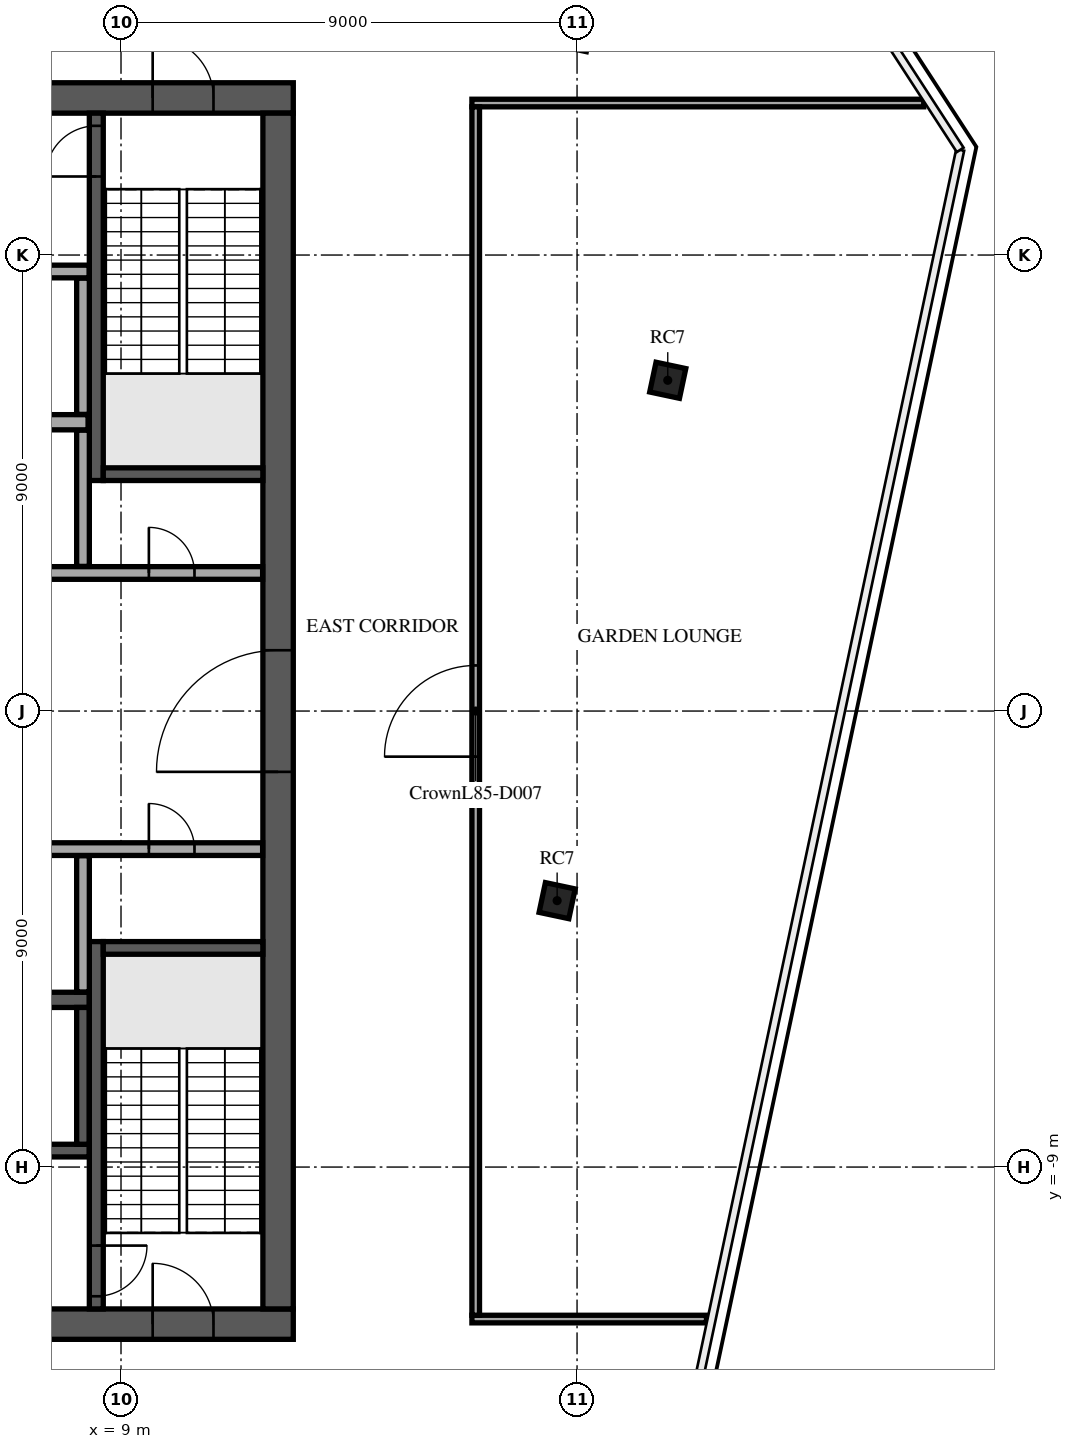
"""IFC4 building model, lengths in metres.
Left out: names, types, materials, properties, quantities, classifications, styles, units other than length and angle.
Written with IfcOpenShell. Run it as: python <this file> out.ifc"""

import sys

from ifc_helpers import new_model, si_unit, direction, frame, frame_2d, origin, origin_2d, place, context, subcontext, project, spatial, rectangle, extrude, element, fill, save


model = new_model("IFC4")
c1 = context("Model", 3, precision=1e-05, world=origin(), true_north=direction((0.0, 1.0)))
c2 = subcontext(c1, "Body", "Model", "MODEL_VIEW")
j1 = project(units=[si_unit("LENGTHUNIT", "METRE"), si_unit("PLANEANGLEUNIT", "RADIAN")], contexts=[c1])
p1 = place(None, origin())
s1 = spatial("IfcSite", under=j1, at=p1, CompositionType="ELEMENT")
p2 = place(p1, origin())
s2 = spatial("IfcBuilding", under=s1, at=p2, CompositionType="ELEMENT")
p3 = place(p2, frame((0.0, 0.0, 363.1)))
s3 = spatial("IfcBuildingStorey", under=s2, at=p3, CompositionType="ELEMENT", Elevation=363.1)
for number, where, z_axis, x_axis in (
    (1, (17.607, -3.742, 0.0), (0.0, 0.0, 1.0), (0.208, 0.978, 0.0)),
    (2, (19.79, 6.528, 0.0), (0.0, 0.0, 1.0), (0.208, 0.978, 0.0)),
):
    element("IfcColumn", number, at=place(p3, frame(where, z_axis=z_axis, x_axis=x_axis)), inside=s3, PredefinedType="COLUMN", context=c2, shape_type="SweptSolid", body=[
        extrude(rectangle(XDim=0.6, YDim=0.6, at=origin_2d()), origin(), (0.0, 0.0, 1.0), 5.0),
    ])
p4 = place(p3, frame((-12.4, 12.1, 0.0), z_axis=(0.0, 0.0, 1.0), x_axis=(1.0, 0.0, 0.0)))
e3 = element("IfcWall", 3, at=p4, inside=s3, PredefinedType="SHEAR", context=c2, shape_type="SweptSolid", body=[
    extrude(rectangle(XDim=24.8, YDim=0.6, at=frame_2d((12.4, 0.0))), origin(), (0.0, 0.0, 1.0), 4.7),
])
p5 = place(p4, frame((11.2, 0.0, 0.0)))
e4 = element("IfcOpeningElement", 4, at=p5, cuts=e3, PredefinedType="OPENING", context=c2, shape_type="SweptSolid", body=[
    extrude(rectangle(XDim=2.4, YDim=2.4, at=frame_2d((1.2, 1.2))), frame((0.0, 0.31, 0.0), z_axis=(0.0, -1.0, 0.0), x_axis=(1.0, 0.0, 0.0)), (0.0, 0.0, 1.0), 0.62),
])
p6 = place(p4, frame((22.025, 0.0, 0.0)))
e5 = element("IfcOpeningElement", 5, at=p6, cuts=e3, PredefinedType="OPENING", context=c2, shape_type="SweptSolid", body=[
    extrude(rectangle(XDim=1.2, YDim=2.1, at=frame_2d((0.6, 1.05))), frame((0.0, 0.31, 0.0), z_axis=(0.0, -1.0, 0.0), x_axis=(1.0, 0.0, 0.0)), (0.0, 0.0, 1.0), 0.62),
])
p7 = place(p4, frame((1.0, 0.0, 0.0)))
e6 = element("IfcOpeningElement", 6, at=p7, cuts=e3, PredefinedType="OPENING", context=c2, shape_type="SweptSolid", body=[
    extrude(rectangle(XDim=1.0, YDim=2.1, at=frame_2d((0.5, 1.05))), frame((0.0, 0.31, 0.0), z_axis=(0.0, -1.0, 0.0), x_axis=(1.0, 0.0, 0.0)), (0.0, 0.0, 1.0), 0.62),
])
p8 = place(p3, frame((-12.4, -12.1, 0.0), z_axis=(0.0, 0.0, 1.0), x_axis=(1.0, 0.0, 0.0)))
e7 = element("IfcWall", 7, at=p8, inside=s3, PredefinedType="SHEAR", context=c2, shape_type="SweptSolid", body=[
    extrude(rectangle(XDim=24.8, YDim=0.6, at=frame_2d((12.4, 0.0))), origin(), (0.0, 0.0, 1.0), 4.7),
])
p9 = place(p8, frame((7.3, 0.0, 0.0)))
e8 = element("IfcOpeningElement", 8, at=p9, cuts=e7, PredefinedType="OPENING", context=c2, shape_type="SweptSolid", body=[
    extrude(rectangle(XDim=2.0, YDim=2.1, at=frame_2d((1.0, 1.05))), frame((0.0, 0.31, 0.0), z_axis=(0.0, -1.0, 0.0), x_axis=(1.0, 0.0, 0.0)), (0.0, 0.0, 1.0), 0.62),
])
p10 = place(p8, frame((17.425, 0.0, 0.0)))
e9 = element("IfcOpeningElement", 9, at=p10, cuts=e7, PredefinedType="OPENING", context=c2, shape_type="SweptSolid", body=[
    extrude(rectangle(XDim=1.2, YDim=2.1, at=frame_2d((0.6, 1.05))), frame((0.0, 0.31, 0.0), z_axis=(0.0, -1.0, 0.0), x_axis=(1.0, 0.0, 0.0)), (0.0, 0.0, 1.0), 0.62),
])
p11 = place(p8, frame((1.575, 0.0, 0.0)))
e10 = element("IfcOpeningElement", 10, at=p11, cuts=e7, PredefinedType="OPENING", context=c2, shape_type="SweptSolid", body=[
    extrude(rectangle(XDim=1.2, YDim=2.1, at=frame_2d((0.6, 1.05))), frame((0.0, 0.31, 0.0), z_axis=(0.0, -1.0, 0.0), x_axis=(1.0, 0.0, 0.0)), (0.0, 0.0, 1.0), 0.62),
])
p12 = place(p8, frame((22.025, 0.0, 0.0)))
e11 = element("IfcOpeningElement", 11, at=p12, cuts=e7, PredefinedType="OPENING", context=c2, shape_type="SweptSolid", body=[
    extrude(rectangle(XDim=1.2, YDim=2.1, at=frame_2d((0.6, 1.05))), frame((0.0, 0.31, 0.0), z_axis=(0.0, -1.0, 0.0), x_axis=(1.0, 0.0, 0.0)), (0.0, 0.0, 1.0), 0.62),
])
p13 = place(p3, frame((12.1, -11.8, 0.0), z_axis=(0.0, 0.0, 1.0), x_axis=(0.0, 1.0, 0.0)))
e12 = element("IfcWall", 12, at=p13, inside=s3, PredefinedType="SHEAR", context=c2, shape_type="SweptSolid", body=[
    extrude(rectangle(XDim=23.6, YDim=0.6, at=frame_2d((11.8, 0.0))), origin(), (0.0, 0.0, 1.0), 4.7),
])
p14 = place(p13, frame((10.6, 0.0, 0.0)))
e13 = element("IfcOpeningElement", 13, at=p14, cuts=e12, PredefinedType="OPENING", context=c2, shape_type="SweptSolid", body=[
    extrude(rectangle(XDim=2.4, YDim=2.4, at=frame_2d((1.2, 1.2))), frame((0.0, 0.31, 0.0), z_axis=(0.0, -1.0, 0.0), x_axis=(1.0, 0.0, 0.0)), (0.0, 0.0, 1.0), 0.62),
])
p15 = place(p3, frame((-2.875, -5.7, 0.0), z_axis=(0.0, 0.0, 1.0), x_axis=(1.0, 0.0, 0.0)))
e14 = element("IfcWall", 14, at=p15, inside=s3, PredefinedType="SOLIDWALL", context=c2, shape_type="SweptSolid", body=[
    extrude(rectangle(XDim=11.25, YDim=0.3, at=frame_2d((5.625, 0.0))), origin(), (0.0, 0.0, 1.0), 4.7),
])
p16 = place(p3, frame((-2.875, -8.675, 0.0), z_axis=(0.0, 0.0, 1.0), x_axis=(1.0, 0.0, 0.0)))
e15 = element("IfcWall", 15, at=p16, inside=s3, PredefinedType="SOLIDWALL", context=c2, shape_type="SweptSolid", body=[
    extrude(rectangle(XDim=11.25, YDim=0.25, at=frame_2d((5.625, 0.0))), origin(), (0.0, 0.0, 1.0), 4.7),
])
p17 = place(p16, frame((0.9, 0.0, 0.0)))
e16 = element("IfcOpeningElement", 16, at=p17, cuts=e15, PredefinedType="OPENING", context=c2, shape_type="SweptSolid", body=[
    extrude(rectangle(XDim=1.2, YDim=2.1, at=frame_2d((0.6, 1.05))), frame((0.0, 0.135, 0.0), z_axis=(0.0, -1.0, 0.0), x_axis=(1.0, 0.0, 0.0)), (0.0, 0.0, 1.0), 0.27),
])
p18 = place(p16, frame((3.65, 0.0, 0.0)))
e17 = element("IfcOpeningElement", 17, at=p18, cuts=e15, PredefinedType="OPENING", context=c2, shape_type="SweptSolid", body=[
    extrude(rectangle(XDim=1.2, YDim=2.1, at=frame_2d((0.6, 1.05))), frame((0.0, 0.135, 0.0), z_axis=(0.0, -1.0, 0.0), x_axis=(1.0, 0.0, 0.0)), (0.0, 0.0, 1.0), 0.27),
])
p19 = place(p16, frame((6.4, 0.0, 0.0)))
e18 = element("IfcOpeningElement", 18, at=p19, cuts=e15, PredefinedType="OPENING", context=c2, shape_type="SweptSolid", body=[
    extrude(rectangle(XDim=1.2, YDim=2.1, at=frame_2d((0.6, 1.05))), frame((0.0, 0.135, 0.0), z_axis=(0.0, -1.0, 0.0), x_axis=(1.0, 0.0, 0.0)), (0.0, 0.0, 1.0), 0.27),
])
p20 = place(p16, frame((9.15, 0.0, 0.0)))
e19 = element("IfcOpeningElement", 19, at=p20, cuts=e15, PredefinedType="OPENING", context=c2, shape_type="SweptSolid", body=[
    extrude(rectangle(XDim=1.2, YDim=2.1, at=frame_2d((0.6, 1.05))), frame((0.0, 0.135, 0.0), z_axis=(0.0, -1.0, 0.0), x_axis=(1.0, 0.0, 0.0)), (0.0, 0.0, 1.0), 0.27),
])
p21 = place(p3, frame((8.25, -8.55, 0.0), z_axis=(0.0, 0.0, 1.0), x_axis=(0.0, 1.0, 0.0)))
e20 = element("IfcWall", 20, at=p21, inside=s3, PredefinedType="SOLIDWALL", context=c2, shape_type="SweptSolid", body=[
    extrude(rectangle(XDim=2.7, YDim=0.25, at=frame_2d((1.35, 0.0))), origin(), (0.0, 0.0, 1.0), 4.7),
])
p22 = place(p3, frame((8.512, 4.55, 0.0), z_axis=(0.0, 0.0, 1.0), x_axis=(0.0, 1.0, 0.0)))
e21 = element("IfcWall", 21, at=p22, inside=s3, PredefinedType="SOLIDWALL", context=c2, shape_type="SweptSolid", body=[
    extrude(rectangle(XDim=7.25, YDim=0.275, at=frame_2d((3.625, 0.0))), origin(), (0.0, 0.0, 1.0), 4.7),
])
p23 = place(p22, frame((6.0, 0.0, 0.0)))
e22 = element("IfcOpeningElement", 22, at=p23, cuts=e21, PredefinedType="OPENING", context=c2, shape_type="SweptSolid", body=[
    extrude(rectangle(XDim=1.0, YDim=2.1, at=frame_2d((0.5, 1.05))), frame((0.0, 0.147, 0.0), z_axis=(0.0, -1.0, 0.0), x_axis=(1.0, 0.0, 0.0)), (0.0, 0.0, 1.0), 0.295),
])
p24 = place(p3, frame((8.65, 4.675, 0.0), z_axis=(0.0, 0.0, 1.0), x_axis=(1.0, 0.0, 0.0)))
e23 = element("IfcWall", 23, at=p24, inside=s3, PredefinedType="SOLIDWALL", context=c2, shape_type="SweptSolid", body=[
    extrude(rectangle(XDim=3.15, YDim=0.25, at=frame_2d((1.575, 0.0))), origin(), (0.0, 0.0, 1.0), 4.7),
])
p25 = place(p3, frame((8.512, -4.55, 0.0), z_axis=(0.0, 0.0, 1.0), x_axis=(0.0, -1.0, 0.0)))
e24 = element("IfcWall", 24, at=p25, inside=s3, PredefinedType="SOLIDWALL", context=c2, shape_type="SweptSolid", body=[
    extrude(rectangle(XDim=7.25, YDim=0.275, at=frame_2d((3.625, 0.0))), origin(), (0.0, 0.0, 1.0), 4.7),
])
p26 = place(p25, frame((6.0, 0.0, 0.0)))
e25 = element("IfcOpeningElement", 25, at=p26, cuts=e24, PredefinedType="OPENING", context=c2, shape_type="SweptSolid", body=[
    extrude(rectangle(XDim=1.0, YDim=2.1, at=frame_2d((0.5, 1.05))), frame((0.0, 0.147, 0.0), z_axis=(0.0, -1.0, 0.0), x_axis=(1.0, 0.0, 0.0)), (0.0, 0.0, 1.0), 0.295),
])
p27 = place(p3, frame((8.65, -4.675, 0.0), z_axis=(0.0, 0.0, 1.0), x_axis=(1.0, 0.0, 0.0)))
e26 = element("IfcWall", 26, at=p27, inside=s3, PredefinedType="SOLIDWALL", context=c2, shape_type="SweptSolid", body=[
    extrude(rectangle(XDim=3.15, YDim=0.25, at=frame_2d((1.575, 0.0))), origin(), (0.0, 0.0, 1.0), 4.7),
])
p28 = place(p3, frame((8.25, -5.545, 0.0), z_axis=(0.0, 0.0, 1.0), x_axis=(0.0, 1.0, 0.0)))
e27 = element("IfcWall", 27, at=p28, inside=s3, PredefinedType="PARTITIONING", context=c2, shape_type="SweptSolid", body=[
    extrude(rectangle(XDim=2.69, YDim=0.25, at=frame_2d((1.345, 0.0))), origin(), (0.0, 0.0, 1.0), 4.7),
])
p29 = place(p3, frame((5.63, -2.725, 0.0), z_axis=(0.0, 0.0, 1.0), x_axis=(1.0, 0.0, 0.0)))
e28 = element("IfcWall", 28, at=p29, inside=s3, PredefinedType="PARTITIONING", context=c2, shape_type="SweptSolid", body=[
    extrude(rectangle(XDim=6.165, YDim=0.25, at=frame_2d((3.083, 0.0))), origin(), (0.0, 0.0, 1.0), 4.7),
])
p30 = place(p29, frame((0.745, 0.0, 0.0)))
e29 = element("IfcOpeningElement", 29, at=p30, cuts=e28, PredefinedType="OPENING", context=c2, shape_type="SweptSolid", body=[
    extrude(rectangle(XDim=1.0, YDim=2.1, at=frame_2d((0.5, 1.05))), frame((0.0, 0.135, 0.0), z_axis=(0.0, -1.0, 0.0), x_axis=(1.0, 0.0, 0.0)), (0.0, 0.0, 1.0), 0.27),
])
p31 = place(p29, frame((3.92, 0.0, 0.0)))
e30 = element("IfcOpeningElement", 30, at=p31, cuts=e28, PredefinedType="OPENING", context=c2, shape_type="SweptSolid", body=[
    extrude(rectangle(XDim=0.9, YDim=2.1, at=frame_2d((0.45, 1.05))), frame((0.0, 0.135, 0.0), z_axis=(0.0, -1.0, 0.0), x_axis=(1.0, 0.0, 0.0)), (0.0, 0.0, 1.0), 0.27),
])
p32 = place(p3, frame((-11.795, 2.725, 0.0), z_axis=(0.0, 0.0, 1.0), x_axis=(1.0, 0.0, 0.0)))
e31 = element("IfcWall", 31, at=p32, inside=s3, PredefinedType="PARTITIONING", context=c2, shape_type="SweptSolid", body=[
    extrude(rectangle(XDim=23.59, YDim=0.25, at=frame_2d((11.795, 0.0))), origin(), (0.0, 0.0, 1.0), 4.7),
])
p33 = place(p32, frame((21.345, 0.0, 0.0)))
e32 = element("IfcOpeningElement", 32, at=p33, cuts=e31, PredefinedType="OPENING", context=c2, shape_type="SweptSolid", body=[
    extrude(rectangle(XDim=0.9, YDim=2.1, at=frame_2d((0.45, 1.05))), frame((0.0, 0.135, 0.0), z_axis=(0.0, -1.0, 0.0), x_axis=(1.0, 0.0, 0.0)), (0.0, 0.0, 1.0), 0.27),
])
p34 = place(p32, frame((1.345, 0.0, 0.0)))
e33 = element("IfcOpeningElement", 33, at=p34, cuts=e31, PredefinedType="OPENING", context=c2, shape_type="SweptSolid", body=[
    extrude(rectangle(XDim=0.9, YDim=2.1, at=frame_2d((0.45, 1.05))), frame((0.0, 0.135, 0.0), z_axis=(0.0, -1.0, 0.0), x_axis=(1.0, 0.0, 0.0)), (0.0, 0.0, 1.0), 0.27),
])
p35 = place(p32, frame((4.42, 0.0, 0.0)))
e34 = element("IfcOpeningElement", 34, at=p35, cuts=e31, PredefinedType="OPENING", context=c2, shape_type="SweptSolid", body=[
    extrude(rectangle(XDim=1.0, YDim=2.1, at=frame_2d((0.5, 1.05))), frame((0.0, 0.135, 0.0), z_axis=(0.0, -1.0, 0.0), x_axis=(1.0, 0.0, 0.0)), (0.0, 0.0, 1.0), 0.27),
])
p36 = place(p32, frame((9.82, 0.0, 0.0)))
e35 = element("IfcOpeningElement", 35, at=p36, cuts=e31, PredefinedType="OPENING", context=c2, shape_type="SweptSolid", body=[
    extrude(rectangle(XDim=1.2, YDim=2.1, at=frame_2d((0.6, 1.05))), frame((0.0, 0.135, 0.0), z_axis=(0.0, -1.0, 0.0), x_axis=(1.0, 0.0, 0.0)), (0.0, 0.0, 1.0), 0.27),
])
p37 = place(p3, frame((8.25, 2.855, 0.0), z_axis=(0.0, 0.0, 1.0), x_axis=(0.0, 1.0, 0.0)))
e36 = element("IfcWall", 36, at=p37, inside=s3, PredefinedType="PARTITIONING", context=c2, shape_type="SweptSolid", body=[
    extrude(rectangle(XDim=2.69, YDim=0.25, at=frame_2d((1.345, 0.0))), origin(), (0.0, 0.0, 1.0), 4.7),
])
p38 = place(p3, frame((-8.35, 5.7, 0.0), z_axis=(0.0, 0.0, 1.0), x_axis=(1.0, 0.0, 0.0)))
e37 = element("IfcWall", 37, at=p38, inside=s3, PredefinedType="PARTITIONING", context=c2, shape_type="SweptSolid", body=[
    extrude(rectangle(XDim=16.7, YDim=0.3, at=frame_2d((8.35, 0.0))), origin(), (0.0, 0.0, 1.0), 4.7),
])
p39 = place(p3, frame((8.25, 5.855, 0.0), z_axis=(0.0, 0.0, 1.0), x_axis=(0.0, 1.0, 0.0)))
e38 = element("IfcWall", 38, at=p39, inside=s3, PredefinedType="PARTITIONING", context=c2, shape_type="SweptSolid", body=[
    extrude(rectangle(XDim=2.69, YDim=0.25, at=frame_2d((1.345, 0.0))), origin(), (0.0, 0.0, 1.0), 4.7),
])
p40 = place(p3, frame((-8.35, 8.675, 0.0), z_axis=(0.0, 0.0, 1.0), x_axis=(1.0, 0.0, 0.0)))
e39 = element("IfcWall", 39, at=p40, inside=s3, PredefinedType="PARTITIONING", context=c2, shape_type="SweptSolid", body=[
    extrude(rectangle(XDim=16.72, YDim=0.25, at=frame_2d((8.36, 0.0))), origin(), (0.0, 0.0, 1.0), 4.7),
])
p41 = place(p40, frame((0.975, 0.0, 0.0)))
e40 = element("IfcOpeningElement", 40, at=p41, cuts=e39, PredefinedType="OPENING", context=c2, shape_type="SweptSolid", body=[
    extrude(rectangle(XDim=1.0, YDim=2.1, at=frame_2d((0.5, 1.05))), frame((0.0, 0.135, 0.0), z_axis=(0.0, -1.0, 0.0), x_axis=(1.0, 0.0, 0.0)), (0.0, 0.0, 1.0), 0.27),
])
p42 = place(p40, frame((6.375, 0.0, 0.0)))
e41 = element("IfcOpeningElement", 41, at=p42, cuts=e39, PredefinedType="OPENING", context=c2, shape_type="SweptSolid", body=[
    extrude(rectangle(XDim=1.2, YDim=2.1, at=frame_2d((0.6, 1.05))), frame((0.0, 0.135, 0.0), z_axis=(0.0, -1.0, 0.0), x_axis=(1.0, 0.0, 0.0)), (0.0, 0.0, 1.0), 0.27),
])
p43 = place(p3, frame((15.925, -12.0, 0.0), z_axis=(0.0, 0.0, 1.0), x_axis=(1.0, 0.0, 0.0)))
e42 = element("IfcWall", 42, at=p43, inside=s3, PredefinedType="PARTITIONING", context=c2, shape_type="SweptSolid", body=[
    extrude(rectangle(XDim=4.629, YDim=0.15, at=frame_2d((2.314, 0.0))), origin(), (0.0, 0.0, 1.0), 4.7),
])
p44 = place(p3, frame((15.925, 12.0, 0.0), z_axis=(0.0, 0.0, 1.0), x_axis=(1.0, 0.0, 0.0)))
e43 = element("IfcWall", 43, at=p44, inside=s3, PredefinedType="PARTITIONING", context=c2, shape_type="SweptSolid", body=[
    extrude(rectangle(XDim=8.917, YDim=0.15, at=frame_2d((4.458, 0.0))), origin(), (0.0, 0.0, 1.0), 4.7),
])
p45 = place(p3, frame((16.0, -11.925, 0.0), z_axis=(0.0, 0.0, 1.0), x_axis=(0.0, 1.0, 0.0)))
e44 = element("IfcWall", 44, at=p45, inside=s3, PredefinedType="PARTITIONING", context=c2, shape_type="SweptSolid", body=[
    extrude(rectangle(XDim=23.85, YDim=0.15, at=frame_2d((11.925, 0.0))), origin(), (0.0, 0.0, 1.0), 4.23),
])
p46 = place(p45, frame((11.025, 0.0, 0.0)))
e45 = element("IfcOpeningElement", 45, at=p46, cuts=e44, PredefinedType="OPENING", context=c2, shape_type="SweptSolid", body=[
    extrude(rectangle(XDim=1.8, YDim=2.1, at=frame_2d((0.9, 1.05))), frame((0.0, 0.085, 0.0), z_axis=(0.0, -1.0, 0.0), x_axis=(1.0, 0.0, 0.0)), (0.0, 0.0, 1.0), 0.17),
])
p47 = place(p6, origin())
e46 = element("IfcDoor", 46, at=p47, inside=s3, OperationType="SINGLE_SWING_LEFT", PredefinedType="DOOR", context=c2, shape_type="SweptSolid", body=[
    extrude(rectangle(XDim=1.2, YDim=2.1, at=frame_2d((0.6, 1.05))), frame((0.0, 0.025, 0.0), z_axis=(0.0, -1.0, 0.0), x_axis=(1.0, 0.0, 0.0)), (0.0, 0.0, 1.0), 0.05),
])
fill(e5, e46)
p48 = place(p12, origin())
e47 = element("IfcDoor", 47, at=p48, inside=s3, OperationType="SINGLE_SWING_LEFT", PredefinedType="DOOR", context=c2, shape_type="SweptSolid", body=[
    extrude(rectangle(XDim=1.2, YDim=2.1, at=frame_2d((0.6, 1.05))), frame((0.0, 0.025, 0.0), z_axis=(0.0, -1.0, 0.0), x_axis=(1.0, 0.0, 0.0)), (0.0, 0.0, 1.0), 0.05),
])
fill(e11, e47)
p49 = place(p14, origin())
e48 = element("IfcDoor", 48, at=p49, inside=s3, OperationType="SINGLE_SWING_LEFT", PredefinedType="DOOR", context=c2, shape_type="SweptSolid", body=[
    extrude(rectangle(XDim=2.4, YDim=2.4, at=frame_2d((1.2, 1.2))), frame((0.0, 0.025, 0.0), z_axis=(0.0, -1.0, 0.0), x_axis=(1.0, 0.0, 0.0)), (0.0, 0.0, 1.0), 0.05),
])
fill(e13, e48)
p50 = place(p23, origin())
e49 = element("IfcDoor", 49, at=p50, inside=s3, OperationType="SINGLE_SWING_LEFT", PredefinedType="DOOR", context=c2, shape_type="SweptSolid", body=[
    extrude(rectangle(XDim=1.0, YDim=2.1, at=frame_2d((0.5, 1.05))), frame((0.0, 0.025, 0.0), z_axis=(0.0, -1.0, 0.0), x_axis=(1.0, 0.0, 0.0)), (0.0, 0.0, 1.0), 0.05),
])
fill(e22, e49)
p51 = place(p26, origin())
e50 = element("IfcDoor", 50, at=p51, inside=s3, OperationType="SINGLE_SWING_LEFT", PredefinedType="DOOR", context=c2, shape_type="SweptSolid", body=[
    extrude(rectangle(XDim=1.0, YDim=2.1, at=frame_2d((0.5, 1.05))), frame((0.0, 0.025, 0.0), z_axis=(0.0, -1.0, 0.0), x_axis=(1.0, 0.0, 0.0)), (0.0, 0.0, 1.0), 0.05),
])
fill(e25, e50)
p52 = place(p33, origin())
e51 = element("IfcDoor", 51, at=p52, inside=s3, OperationType="SINGLE_SWING_RIGHT", PredefinedType="DOOR", context=c2, shape_type="SweptSolid", body=[
    extrude(rectangle(XDim=0.9, YDim=2.1, at=frame_2d((0.45, 1.05))), frame((0.0, 0.025, 0.0), z_axis=(0.0, -1.0, 0.0), x_axis=(1.0, 0.0, 0.0)), (0.0, 0.0, 1.0), 0.05),
])
fill(e32, e51)
p53 = place(p31, origin())
e52 = element("IfcDoor", 52, at=p53, inside=s3, OperationType="SINGLE_SWING_RIGHT", PredefinedType="DOOR", context=c2, shape_type="SweptSolid", body=[
    extrude(rectangle(XDim=0.9, YDim=2.1, at=frame_2d((0.45, 1.05))), frame((0.0, 0.025, 0.0), z_axis=(0.0, -1.0, 0.0), x_axis=(1.0, 0.0, 0.0)), (0.0, 0.0, 1.0), 0.05),
])
fill(e30, e52)
p54 = place(p46, origin())
e53 = element("IfcDoor", 53, at=p54, inside=s3, OperationType="DOUBLE_DOOR_SINGLE_SWING", PredefinedType="DOOR", context=c2, shape_type="SweptSolid", body=[
    extrude(rectangle(XDim=1.8, YDim=2.1, at=frame_2d((0.9, 1.05))), frame((0.0, 0.025, 0.0), z_axis=(0.0, -1.0, 0.0), x_axis=(1.0, 0.0, 0.0)), (0.0, 0.0, 1.0), 0.05),
])
fill(e45, e53)
save(model, sys.argv[1])
